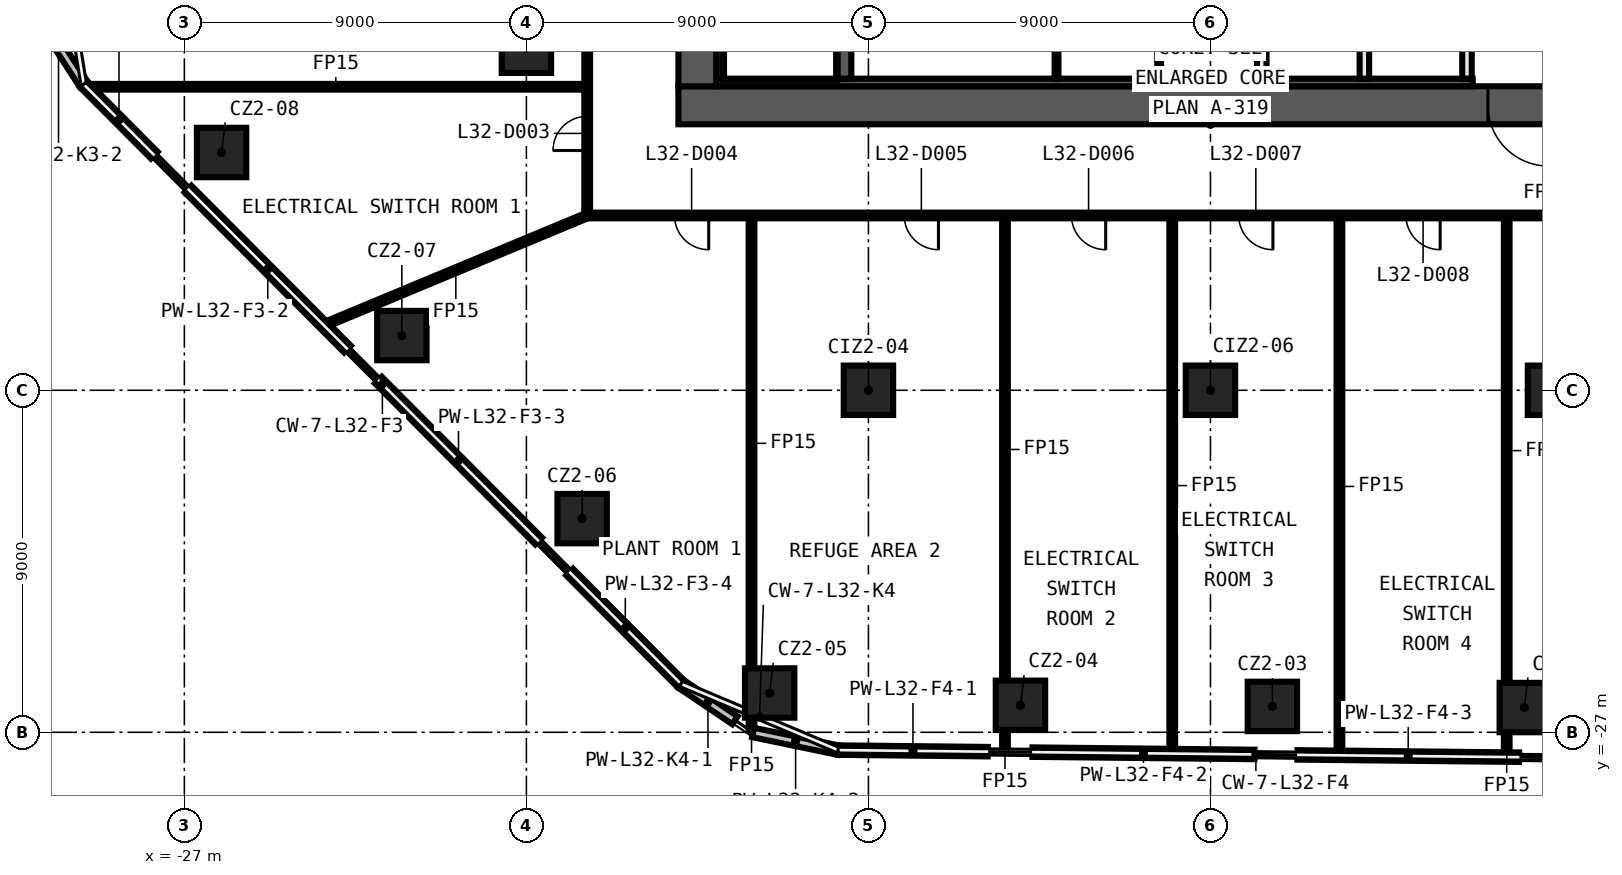
"""IFC4 building model, lengths in metres.
Left out: names, types, materials, properties, quantities, classifications, styles, units other than length and angle.
Written with IfcOpenShell. Run it as: python <this file> out.ifc"""

import sys

from ifc_helpers import new_model, si_unit, direction, frame, frame_2d, origin, origin_2d, place, context, subcontext, project, spatial, rectangle, extrude, element, fill, save


model = new_model("IFC4")
c1 = context("Model", 3, precision=1e-05, world=origin(), true_north=direction((0.0, 1.0)))
c2 = subcontext(c1, "Body", "Model", "MODEL_VIEW")
j1 = project(units=[si_unit("LENGTHUNIT", "METRE"), si_unit("PLANEANGLEUNIT", "RADIAN")], contexts=[c1])
p1 = place(None, origin())
s1 = spatial("IfcSite", under=j1, at=p1, CompositionType="ELEMENT")
p2 = place(p1, origin())
s2 = spatial("IfcBuilding", under=s1, at=p2, CompositionType="ELEMENT")
p3 = place(p2, frame((0.0, 0.0, 145.6)))
s3 = spatial("IfcBuildingStorey", under=s2, at=p3, CompositionType="ELEMENT", Elevation=145.6)
for number, where, z_axis, x_axis in (
    (1, (8.258, -26.349, 0.0), (0.0, 0.0, 1.0), (1.0, 0.0, 0.0)),
    (2, (1.629, -26.319, 0.0), (0.0, 0.0, 1.0), (1.0, 0.0, 0.0)),
    (3, (-5.0, -26.29, 0.0), (0.0, 0.0, 1.0), (1.0, 0.0, 0.0)),
    (4, (-11.599, -25.966, 0.0), (0.0, 0.0, 1.0), (1.0, 0.0, 0.0)),
    (5, (-16.533, -21.377, 0.0), (0.0, 0.0, 1.0), (1.0, 0.0, 0.0)),
    (6, (-21.277, -16.56, 0.0), (0.0, 0.0, 1.0), (1.0, 0.0, 0.0)),
    (7, (-26.021, -11.743, 0.0), (0.0, 0.0, 1.0), (1.0, 0.0, 0.0)),
    (8, (-18.0, -9.0, 0.0), (0.0, 0.0, 1.0), (1.0, 0.0, 0.0)),
    (9, (-9.0, -18.0, 0.0), (0.0, 0.0, 1.0), (1.0, 0.0, 0.0)),
    (10, (0.0, -18.0, 0.0), (0.0, 0.0, 1.0), (1.0, 0.0, 0.0)),
    (11, (9.0, -18.0, 0.0), (0.0, 0.0, 1.0), (1.0, 0.0, 0.0)),
):
    element("IfcColumn", number, at=place(p3, frame(where, z_axis=z_axis, x_axis=x_axis)), inside=s3, PredefinedType="COLUMN", context=c2, shape_type="SweptSolid", body=[
        extrude(rectangle(XDim=1.3, YDim=1.3, at=origin_2d()), origin(), (0.0, 0.0, 1.0), 5.55),
    ])
p4 = place(p3, frame((16.475, -13.4, 0.0), z_axis=(0.0, 0.0, 1.0), x_axis=(-1.0, 0.0, 0.0)))
e12 = element("IfcWall", 12, at=p4, inside=s3, PredefinedType="PARTITIONING", context=c2, shape_type="SweptSolid", body=[
    extrude(rectangle(XDim=32.95, YDim=0.15, at=frame_2d((16.475, 0.0))), origin(), (0.0, 0.0, 1.0), 5.55),
])
p5 = place(p4, frame((29.678, 0.0, 0.0)))
e13 = element("IfcOpeningElement", 13, at=p5, cuts=e12, PredefinedType="OPENING", context=c2, shape_type="SweptSolid", body=[
    extrude(rectangle(XDim=0.9, YDim=2.1, at=frame_2d((0.45, 1.05))), frame((0.0, 0.085, 0.0), z_axis=(0.0, -1.0, 0.0), x_axis=(1.0, 0.0, 0.0)), (0.0, 0.0, 1.0), 0.17),
])
p6 = place(p4, frame((23.632, 0.0, 0.0)))
e14 = element("IfcOpeningElement", 14, at=p6, cuts=e12, PredefinedType="OPENING", context=c2, shape_type="SweptSolid", body=[
    extrude(rectangle(XDim=0.9, YDim=2.1, at=frame_2d((0.45, 1.05))), frame((0.0, 0.085, 0.0), z_axis=(0.0, -1.0, 0.0), x_axis=(1.0, 0.0, 0.0)), (0.0, 0.0, 1.0), 0.17),
])
p7 = place(p4, frame((19.232, 0.0, 0.0)))
e15 = element("IfcOpeningElement", 15, at=p7, cuts=e12, PredefinedType="OPENING", context=c2, shape_type="SweptSolid", body=[
    extrude(rectangle(XDim=0.9, YDim=2.1, at=frame_2d((0.45, 1.05))), frame((0.0, 0.085, 0.0), z_axis=(0.0, -1.0, 0.0), x_axis=(1.0, 0.0, 0.0)), (0.0, 0.0, 1.0), 0.17),
])
p8 = place(p4, frame((14.831, 0.0, 0.0)))
e16 = element("IfcOpeningElement", 16, at=p8, cuts=e12, PredefinedType="OPENING", context=c2, shape_type="SweptSolid", body=[
    extrude(rectangle(XDim=0.9, YDim=2.1, at=frame_2d((0.45, 1.05))), frame((0.0, 0.085, 0.0), z_axis=(0.0, -1.0, 0.0), x_axis=(1.0, 0.0, 0.0)), (0.0, 0.0, 1.0), 0.17),
])
p9 = place(p4, frame((10.43, 0.0, 0.0)))
e17 = element("IfcOpeningElement", 17, at=p9, cuts=e12, PredefinedType="OPENING", context=c2, shape_type="SweptSolid", body=[
    extrude(rectangle(XDim=0.9, YDim=2.1, at=frame_2d((0.45, 1.05))), frame((0.0, 0.085, 0.0), z_axis=(0.0, -1.0, 0.0), x_axis=(1.0, 0.0, 0.0)), (0.0, 0.0, 1.0), 0.17),
])
p10 = place(p4, frame((3.944, 0.0, 0.0)))
e18 = element("IfcOpeningElement", 18, at=p10, cuts=e12, PredefinedType="OPENING", context=c2, shape_type="SweptSolid", body=[
    extrude(rectangle(XDim=0.9, YDim=2.1, at=frame_2d((0.45, 1.05))), frame((0.0, 0.085, 0.0), z_axis=(0.0, -1.0, 0.0), x_axis=(1.0, 0.0, 0.0)), (0.0, 0.0, 1.0), 0.17),
])
p11 = place(p3, frame((-29.556, -10.013, 0.0), z_axis=(0.0, 0.0, 1.0), x_axis=(1.0, 0.0, 0.0)))
e19 = element("IfcWall", 19, at=p11, inside=s3, PredefinedType="PARTITIONING", context=c2, shape_type="SweptSolid", body=[
    extrude(rectangle(XDim=13.081, YDim=0.15, at=frame_2d((6.541, 0.0))), origin(), (0.0, 0.0, 1.0), 5.55),
])
p12 = place(p3, frame((-23.314, -16.279, 0.0), z_axis=(0.0, 0.0, 1.0), x_axis=(0.923146345378, 0.384448728721, 0.0)))
e20 = element("IfcWall", 20, at=p12, inside=s3, PredefinedType="PARTITIONING", context=c2, shape_type="SweptSolid", body=[
    extrude(rectangle(XDim=7.49, YDim=0.15, at=frame_2d((3.745, 0.0))), origin(), (0.0, 0.0, 1.0), 5.55),
])
p13 = place(p3, frame((7.795, -27.632, 0.0), z_axis=(0.0, 0.0, 1.0), x_axis=(0.0, 1.0, 0.0)))
e21 = element("IfcWall", 21, at=p13, inside=s3, PredefinedType="PARTITIONING", context=c2, shape_type="SweptSolid", body=[
    extrude(rectangle(XDim=0.633, YDim=0.15, at=frame_2d((0.316, 0.0))), origin(), (0.0, 0.0, 1.0), 5.55),
])
p14 = place(p3, frame((7.795, -25.699, 0.0), z_axis=(0.0, 0.0, 1.0), x_axis=(0.0, 1.0, 0.0)))
e22 = element("IfcWall", 22, at=p14, inside=s3, PredefinedType="PARTITIONING", context=c2, shape_type="SweptSolid", body=[
    extrude(rectangle(XDim=12.224, YDim=0.15, at=frame_2d((6.112, 0.0))), origin(), (0.0, 0.0, 1.0), 5.55),
])
p15 = place(p3, frame((3.394, -27.586, 0.0), z_axis=(0.0, 0.0, 1.0), x_axis=(0.0, 1.0, 0.0)))
e23 = element("IfcWall", 23, at=p15, inside=s3, PredefinedType="PARTITIONING", context=c2, shape_type="SweptSolid", body=[
    extrude(rectangle(XDim=14.111, YDim=0.15, at=frame_2d((7.056, 0.0))), origin(), (0.0, 0.0, 1.0), 5.55),
])
p16 = place(p3, frame((-1.006, -27.541, 0.0), z_axis=(0.0, 0.0, 1.0), x_axis=(0.0, 1.0, 0.0)))
e24 = element("IfcWall", 24, at=p16, inside=s3, PredefinedType="PARTITIONING", context=c2, shape_type="SweptSolid", body=[
    extrude(rectangle(XDim=14.065, YDim=0.15, at=frame_2d((7.033, 0.0))), origin(), (0.0, 0.0, 1.0), 5.55),
])
p17 = place(p3, frame((-5.407, -27.495, 0.0), z_axis=(0.0, 0.0, 1.0), x_axis=(0.0, 1.0, 0.0)))
e25 = element("IfcWall", 25, at=p17, inside=s3, PredefinedType="PARTITIONING", context=c2, shape_type="SweptSolid", body=[
    extrude(rectangle(XDim=0.555, YDim=0.15, at=frame_2d((0.277, 0.0))), origin(), (0.0, 0.0, 1.0), 5.55),
])
p18 = place(p3, frame((-5.407, -25.64, 0.0), z_axis=(0.0, 0.0, 1.0), x_axis=(0.0, 1.0, 0.0)))
e26 = element("IfcWall", 26, at=p18, inside=s3, PredefinedType="PARTITIONING", context=c2, shape_type="SweptSolid", body=[
    extrude(rectangle(XDim=12.165, YDim=0.15, at=frame_2d((6.083, 0.0))), origin(), (0.0, 0.0, 1.0), 5.55),
])
p19 = place(p3, frame((-12.076, -26.954, 0.0), z_axis=(0.0, 0.0, 1.0), x_axis=(0.0, 1.0, 0.0)))
e27 = element("IfcWall", 27, at=p19, inside=s3, PredefinedType="PARTITIONING", context=c2, shape_type="SweptSolid", body=[
    extrude(rectangle(XDim=0.338, YDim=0.15, at=frame_2d((0.169, 0.0))), origin(), (0.0, 0.0, 1.0), 5.55),
])
p20 = place(p3, frame((-12.076, -25.316, 0.0), z_axis=(0.0, 0.0, 1.0), x_axis=(0.0, 1.0, 0.0)))
e28 = element("IfcWall", 28, at=p20, inside=s3, PredefinedType="PARTITIONING", context=c2, shape_type="SweptSolid", body=[
    extrude(rectangle(XDim=11.841, YDim=0.15, at=frame_2d((5.92, 0.0))), origin(), (0.0, 0.0, 1.0), 5.55),
])
p21 = place(p3, frame((-16.4, -13.325, 0.0), z_axis=(0.0, 0.0, 1.0), x_axis=(0.0, 1.0, 0.0)))
e29 = element("IfcWall", 29, at=p21, inside=s3, PredefinedType="PARTITIONING", context=c2, shape_type="SweptSolid", body=[
    extrude(rectangle(XDim=26.65, YDim=0.15, at=frame_2d((13.325, 0.0))), origin(), (0.0, 0.0, 1.0), 5.55),
])
p22 = place(p21, frame((10.777, 0.0, 0.0)))
e30 = element("IfcOpeningElement", 30, at=p22, cuts=e29, PredefinedType="OPENING", context=c2, shape_type="SweptSolid", body=[
    extrude(rectangle(XDim=0.9, YDim=2.1, at=frame_2d((0.45, 1.05))), frame((0.0, 0.085, 0.0), z_axis=(0.0, -1.0, 0.0), x_axis=(1.0, 0.0, 0.0)), (0.0, 0.0, 1.0), 0.17),
])
p23 = place(p21, frame((6.051, 0.0, 0.0)))
e31 = element("IfcOpeningElement", 31, at=p23, cuts=e29, PredefinedType="OPENING", context=c2, shape_type="SweptSolid", body=[
    extrude(rectangle(XDim=0.9, YDim=2.1, at=frame_2d((0.45, 1.05))), frame((0.0, 0.085, 0.0), z_axis=(0.0, -1.0, 0.0), x_axis=(1.0, 0.0, 0.0)), (0.0, 0.0, 1.0), 0.17),
])
p24 = place(p21, frame((1.634, 0.0, 0.0)))
e32 = element("IfcOpeningElement", 32, at=p24, cuts=e29, PredefinedType="OPENING", context=c2, shape_type="SweptSolid", body=[
    extrude(rectangle(XDim=0.9, YDim=2.1, at=frame_2d((0.45, 1.05))), frame((0.0, 0.085, 0.0), z_axis=(0.0, -1.0, 0.0), x_axis=(1.0, 0.0, 0.0)), (0.0, 0.0, 1.0), 0.17),
])
p25 = place(p21, frame((24.559, 0.0, 0.0)))
e33 = element("IfcOpeningElement", 33, at=p25, cuts=e29, PredefinedType="OPENING", context=c2, shape_type="SweptSolid", body=[
    extrude(rectangle(XDim=0.9, YDim=2.1, at=frame_2d((0.45, 1.05))), frame((0.0, 0.085, 0.0), z_axis=(0.0, -1.0, 0.0), x_axis=(1.0, 0.0, 0.0)), (0.0, 0.0, 1.0), 0.17),
])
p26 = place(p21, frame((19.488, 0.0, 0.0)))
e34 = element("IfcOpeningElement", 34, at=p26, cuts=e29, PredefinedType="OPENING", context=c2, shape_type="SweptSolid", body=[
    extrude(rectangle(XDim=0.9, YDim=2.1, at=frame_2d((0.45, 1.05))), frame((0.0, 0.085, 0.0), z_axis=(0.0, -1.0, 0.0), x_axis=(1.0, 0.0, 0.0)), (0.0, 0.0, 1.0), 0.17),
])
p27 = place(p21, frame((14.977, 0.0, 0.0)))
e35 = element("IfcOpeningElement", 35, at=p27, cuts=e29, PredefinedType="OPENING", context=c2, shape_type="SweptSolid", body=[
    extrude(rectangle(XDim=0.9, YDim=2.1, at=frame_2d((0.45, 1.05))), frame((0.0, 0.085, 0.0), z_axis=(0.0, -1.0, 0.0), x_axis=(1.0, 0.0, 0.0)), (0.0, 0.0, 1.0), 0.17),
])
p28 = place(p3, frame((-30.976, -7.904, 0.0), z_axis=(0.0, 0.0, 1.0), x_axis=(0.544731578252, -0.838610462405, 0.0)))
e36 = element("IfcWall", 36, at=p28, inside=s3, PredefinedType="SOLIDWALL", context=c2, shape_type="SweptSolid", body=[
    extrude(rectangle(XDim=2.44, YDim=0.25, at=frame_2d((1.22, 0.0))), origin(), (0.0, 0.0, 1.0), 5.55),
])
p29 = place(p3, frame((-29.647, -9.95, 0.0), z_axis=(0.0, 0.0, 1.0), x_axis=(0.70571255564, -0.708498263097, 0.0)))
e37 = element("IfcWall", 37, at=p29, inside=s3, PredefinedType="SOLIDWALL", context=c2, shape_type="SweptSolid", body=[
    extrude(rectangle(XDim=2.629, YDim=0.25, at=frame_2d((1.314, 0.0))), origin(), (0.0, 0.0, 1.0), 5.55),
])
p30 = place(p3, frame((-26.902, -12.705, 0.0), z_axis=(0.0, 0.0, 1.0), x_axis=(0.705729391129, -0.708481493405, 0.0)))
e38 = element("IfcWall", 38, at=p30, inside=s3, PredefinedType="SOLIDWALL", context=c2, shape_type="SweptSolid", body=[
    extrude(rectangle(XDim=5.944, YDim=0.25, at=frame_2d((2.972, 0.0))), origin(), (0.0, 0.0, 1.0), 5.55),
])
p31 = place(p3, frame((-21.895, -17.733, 0.0), z_axis=(0.0, 0.0, 1.0), x_axis=(0.705736561779, -0.708474350537, 0.0)))
e39 = element("IfcWall", 39, at=p31, inside=s3, PredefinedType="SOLIDWALL", context=c2, shape_type="SweptSolid", body=[
    extrude(rectangle(XDim=5.975, YDim=0.25, at=frame_2d((2.987, 0.0))), origin(), (0.0, 0.0, 1.0), 5.55),
])
p32 = place(p3, frame((-16.863, -22.784, 0.0), z_axis=(0.0, 0.0, 1.0), x_axis=(0.705753357864, -0.708457618961, 0.0)))
e40 = element("IfcWall", 40, at=p32, inside=s3, PredefinedType="SOLIDWALL", context=c2, shape_type="SweptSolid", body=[
    extrude(rectangle(XDim=4.153, YDim=0.25, at=frame_2d((2.076, 0.0))), origin(), (0.0, 0.0, 1.0), 5.55),
])
p33 = place(p3, frame((-13.932, -25.726, 0.0), z_axis=(0.0, 0.0, 1.0), x_axis=(0.829187406064, -0.558970701938, 0.0)))
e41 = element("IfcWall", 41, at=p33, inside=s3, PredefinedType="SOLIDWALL", context=c2, shape_type="SweptSolid", body=[
    extrude(rectangle(XDim=1.712, YDim=0.25, at=frame_2d((0.856, 0.0))), origin(), (0.0, 0.0, 1.0), 5.55),
])
p34 = place(p3, frame((-12.036, -27.004, 0.0), z_axis=(0.0, 0.0, 1.0), x_axis=(0.979142654686, -0.203173969236, 0.0)))
e42 = element("IfcWall", 42, at=p34, inside=s3, PredefinedType="SOLIDWALL", context=c2, shape_type="SweptSolid", body=[
    extrude(rectangle(XDim=2.287, YDim=0.25, at=frame_2d((1.143, 0.0))), origin(), (0.0, 0.0, 1.0), 5.55),
])
p35 = place(p3, frame((-9.797, -27.469, 0.0), z_axis=(0.0, 0.0, 1.0), x_axis=(0.999945744215, -0.010416747382, 0.0)))
e43 = element("IfcWall", 43, at=p35, inside=s3, PredefinedType="SOLIDWALL", context=c2, shape_type="SweptSolid", body=[
    extrude(rectangle(XDim=3.938, YDim=0.25, at=frame_2d((1.969, 0.0))), origin(), (0.0, 0.0, 1.0), 5.55),
])
p36 = place(p3, frame((-4.684, -27.522, 0.0), z_axis=(0.0, 0.0, 1.0), x_axis=(0.999945846126, -0.010406959903, 0.0)))
e44 = element("IfcWall", 44, at=p36, inside=s3, PredefinedType="SOLIDWALL", context=c2, shape_type="SweptSolid", body=[
    extrude(rectangle(XDim=5.841, YDim=0.25, at=frame_2d((2.921, 0.0))), origin(), (0.0, 0.0, 1.0), 5.55),
])
p37 = place(p3, frame((2.288, -27.595, 0.0), z_axis=(0.0, 0.0, 1.0), x_axis=(0.999945660058, -0.010424822867, 0.0)))
e45 = element("IfcWall", 45, at=p37, inside=s3, PredefinedType="SOLIDWALL", context=c2, shape_type="SweptSolid", body=[
    extrude(rectangle(XDim=5.831, YDim=0.25, at=frame_2d((2.916, 0.0))), origin(), (0.0, 0.0, 1.0), 5.55),
])
p38 = place(p3, frame((14.0, -10.5, 0.0), z_axis=(0.0, 0.0, 1.0), x_axis=(-1.0, 0.0, 0.0)))
e46 = element("IfcWall", 46, at=p38, inside=s3, PredefinedType="SHEAR", context=c2, shape_type="SweptSolid", body=[
    extrude(rectangle(XDim=28.0, YDim=1.0, at=frame_2d((14.0, 0.0))), origin(), (0.0, 0.0, 1.0), 5.55),
])
p39 = place(p38, frame((5.1, 0.0, 0.0)))
e47 = element("IfcOpeningElement", 47, at=p39, cuts=e46, PredefinedType="OPENING", context=c2, shape_type="SweptSolid", body=[
    extrude(rectangle(XDim=1.6, YDim=2.1, at=frame_2d((0.8, 1.05))), frame((0.0, 0.51, 0.0), z_axis=(0.0, -1.0, 0.0), x_axis=(1.0, 0.0, 0.0)), (0.0, 0.0, 1.0), 1.02),
])
p40 = place(p3, frame((-13.5, -10.0, 0.0), z_axis=(0.0, 0.0, 1.0), x_axis=(0.0, 1.0, 0.0)))
e48 = element("IfcWall", 48, at=p40, inside=s3, PredefinedType="SHEAR", context=c2, shape_type="SweptSolid", body=[
    extrude(rectangle(XDim=20.0, YDim=1.0, at=frame_2d((10.0, 0.0))), origin(), (0.0, 0.0, 1.0), 5.55),
])
p41 = place(p3, frame((6.9, -9.9, 0.0), z_axis=(0.0, 0.0, 1.0), x_axis=(-1.0, 0.0, 0.0)))
e49 = element("IfcWall", 49, at=p41, inside=s3, PredefinedType="SHEAR", context=c2, shape_type="SweptSolid", body=[
    extrude(rectangle(XDim=19.9, YDim=0.2, at=frame_2d((9.95, 0.0))), origin(), (0.0, 0.0, 1.0), 5.55),
])
p42 = place(p3, frame((-12.9, -9.8, 0.0), z_axis=(0.0, 0.0, 1.0), x_axis=(0.0, 1.0, 0.0)))
e50 = element("IfcWall", 50, at=p42, inside=s3, PredefinedType="SHEAR", context=c2, shape_type="SweptSolid", body=[
    extrude(rectangle(XDim=19.6, YDim=0.2, at=frame_2d((9.8, 0.0))), origin(), (0.0, 0.0, 1.0), 5.55),
])
p43 = place(p3, frame((-9.65, -9.8, 0.0), z_axis=(0.0, 0.0, 1.0), x_axis=(0.0, 1.0, 0.0)))
e51 = element("IfcWall", 51, at=p43, inside=s3, PredefinedType="SHEAR", context=c2, shape_type="SweptSolid", body=[
    extrude(rectangle(XDim=7.5, YDim=0.4, at=frame_2d((3.75, 0.0))), origin(), (0.0, 0.0, 1.0), 5.55),
])
p44 = place(p43, frame((5.1, 0.0, 0.0)))
e52 = element("IfcOpeningElement", 52, at=p44, cuts=e51, PredefinedType="OPENING", context=c2, shape_type="SweptSolid", body=[
    extrude(rectangle(XDim=1.2, YDim=2.1, at=frame_2d((0.6, 1.05))), frame((0.0, 0.21, 0.0), z_axis=(0.0, -1.0, 0.0), x_axis=(1.0, 0.0, 0.0)), (0.0, 0.0, 1.0), 0.42),
])
for number, where, z_axis, x_axis in (
    (53, (6.75, -9.8, 0.0), (0.0, 0.0, 1.0), (0.0, 1.0, 0.0)),
    (54, (4.05, -9.8, 0.0), (0.0, 0.0, 1.0), (0.0, 1.0, 0.0)),
    (55, (1.35, -9.8, 0.0), (0.0, 0.0, 1.0), (0.0, 1.0, 0.0)),
):
    element("IfcWall", number, at=place(p3, frame(where, z_axis=z_axis, x_axis=x_axis)), inside=s3, PredefinedType="SOLIDWALL", context=c2, shape_type="SweptSolid", body=[
        extrude(rectangle(XDim=2.725, YDim=0.25, at=frame_2d((1.363, 0.0))), origin(), (0.0, 0.0, 1.0), 5.55),
    ])
for number, where, z_axis, x_axis in (
    (56, (-1.35, -9.8, 0.0), (0.0, 0.0, 1.0), (0.0, 1.0, 0.0)),
    (57, (-4.05, -9.8, 0.0), (0.0, 0.0, 1.0), (0.0, 1.0, 0.0)),
):
    element("IfcWall", number, at=place(p3, frame(where, z_axis=z_axis, x_axis=x_axis)), inside=s3, PredefinedType="PARTITIONING", context=c2, shape_type="SweptSolid", body=[
        extrude(rectangle(XDim=2.725, YDim=0.1, at=frame_2d((1.363, 0.0))), origin(), (0.0, 0.0, 1.0), 5.55),
    ])
p45 = place(p24, origin())
e58 = element("IfcDoor", 58, at=p45, inside=s3, OperationType="SINGLE_SWING_RIGHT", PredefinedType="DOOR", context=c2, shape_type="SweptSolid", body=[
    extrude(rectangle(XDim=0.9, YDim=2.1, at=frame_2d((0.45, 1.05))), frame((0.0, 0.025, 0.0), z_axis=(0.0, -1.0, 0.0), x_axis=(1.0, 0.0, 0.0)), (0.0, 0.0, 1.0), 0.05),
])
fill(e32, e58)
p46 = place(p5, origin())
e59 = element("IfcDoor", 59, at=p46, inside=s3, OperationType="SINGLE_SWING_LEFT", PredefinedType="DOOR", context=c2, shape_type="SweptSolid", body=[
    extrude(rectangle(XDim=0.9, YDim=2.1, at=frame_2d((0.45, 1.05))), frame((0.0, 0.025, 0.0), z_axis=(0.0, -1.0, 0.0), x_axis=(1.0, 0.0, 0.0)), (0.0, 0.0, 1.0), 0.05),
])
fill(e13, e59)
p47 = place(p6, origin())
e60 = element("IfcDoor", 60, at=p47, inside=s3, OperationType="SINGLE_SWING_RIGHT", PredefinedType="DOOR", context=c2, shape_type="SweptSolid", body=[
    extrude(rectangle(XDim=0.9, YDim=2.1, at=frame_2d((0.45, 1.05))), frame((0.0, 0.025, 0.0), z_axis=(0.0, -1.0, 0.0), x_axis=(1.0, 0.0, 0.0)), (0.0, 0.0, 1.0), 0.05),
])
fill(e14, e60)
p48 = place(p7, origin())
e61 = element("IfcDoor", 61, at=p48, inside=s3, OperationType="SINGLE_SWING_LEFT", PredefinedType="DOOR", context=c2, shape_type="SweptSolid", body=[
    extrude(rectangle(XDim=0.9, YDim=2.1, at=frame_2d((0.45, 1.05))), frame((0.0, 0.025, 0.0), z_axis=(0.0, -1.0, 0.0), x_axis=(1.0, 0.0, 0.0)), (0.0, 0.0, 1.0), 0.05),
])
fill(e15, e61)
p49 = place(p8, origin())
e62 = element("IfcDoor", 62, at=p49, inside=s3, OperationType="SINGLE_SWING_RIGHT", PredefinedType="DOOR", context=c2, shape_type="SweptSolid", body=[
    extrude(rectangle(XDim=0.9, YDim=2.1, at=frame_2d((0.45, 1.05))), frame((0.0, 0.025, 0.0), z_axis=(0.0, -1.0, 0.0), x_axis=(1.0, 0.0, 0.0)), (0.0, 0.0, 1.0), 0.05),
])
fill(e16, e62)
p50 = place(p9, origin())
e63 = element("IfcDoor", 63, at=p50, inside=s3, OperationType="SINGLE_SWING_LEFT", PredefinedType="DOOR", context=c2, shape_type="SweptSolid", body=[
    extrude(rectangle(XDim=0.9, YDim=2.1, at=frame_2d((0.45, 1.05))), frame((0.0, 0.025, 0.0), z_axis=(0.0, -1.0, 0.0), x_axis=(1.0, 0.0, 0.0)), (0.0, 0.0, 1.0), 0.05),
])
fill(e17, e63)
p51 = place(p39, origin())
e64 = element("IfcDoor", 64, at=p51, inside=s3, OperationType="DOUBLE_DOOR_SINGLE_SWING", PredefinedType="DOOR", context=c2, shape_type="SweptSolid", body=[
    extrude(rectangle(XDim=1.6, YDim=2.1, at=frame_2d((0.8, 1.05))), frame((0.0, 0.025, 0.0), z_axis=(0.0, -1.0, 0.0), x_axis=(1.0, 0.0, 0.0)), (0.0, 0.0, 1.0), 0.05),
])
fill(e47, e64)
save(model, sys.argv[1])
